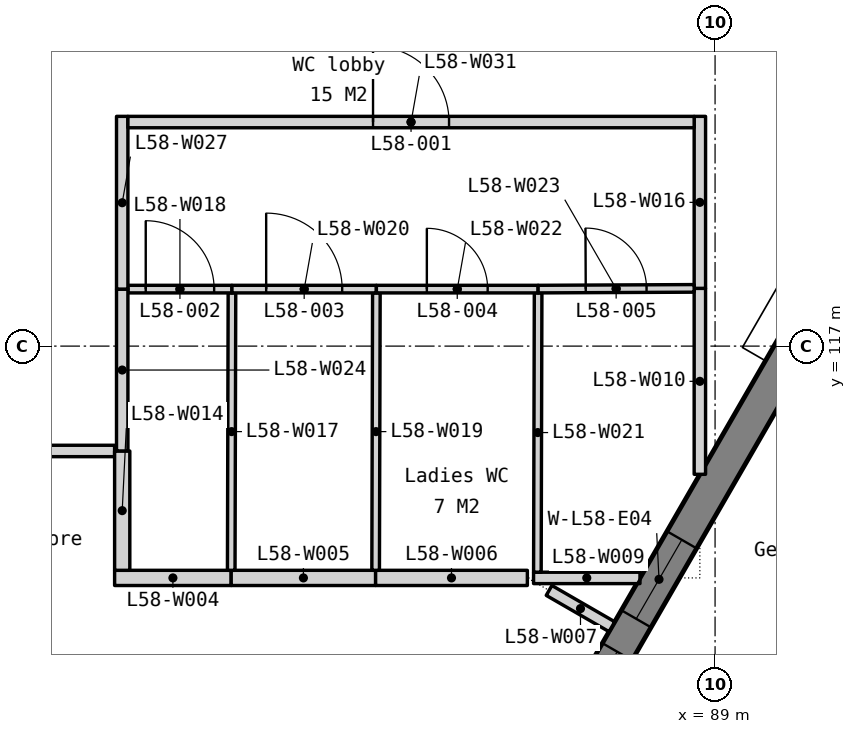
"""IFC4 building model, lengths in metres.
Left out: names, types, materials, properties, quantities, classifications, styles, units other than length and angle.
Written with IfcOpenShell. Run it as: python <this file> out.ifc"""

import sys

from ifc_helpers import new_model, si_unit, direction, frame, frame_2d, origin, place, context, subcontext, project, spatial, polyline, rectangle, outline, extrude, element, fill, save


model = new_model("IFC4")
c1 = context("Model", 3, precision=1e-05, world=origin(), true_north=direction((0.0, 1.0)))
c2 = subcontext(c1, "Body", "Model", "MODEL_VIEW")
j1 = project(units=[si_unit("LENGTHUNIT", "METRE"), si_unit("PLANEANGLEUNIT", "RADIAN")], contexts=[c1])
p1 = place(None, origin())
s1 = spatial("IfcSite", under=j1, at=p1, CompositionType="ELEMENT")
p2 = place(p1, origin())
s2 = spatial("IfcBuilding", under=s1, at=p2, CompositionType="ELEMENT")
p3 = place(p2, frame((0.0, 0.0, 238.7)))
s3 = spatial("IfcBuildingStorey", under=s2, at=p3, CompositionType="ELEMENT", Elevation=238.7)
p4 = place(p3, frame((80.905, 101.188, -0.45), z_axis=(0.0, 0.0, 1.0), x_axis=(0.500002536638, 0.866023939251, 0.0)))
e1 = element("IfcWall", 1, at=p4, inside=s3, PredefinedType="SOLIDWALL", context=c2, shape_type="SweptSolid", body=[
    extrude(outline(polyline([(36.972, 0.0), (36.972, 4.2), (0.0, 4.2), (0.0, 0.0), (36.972, 0.0)])), frame((0.0, 0.225, 0.0), z_axis=(0.0, -1.0, 0.0), x_axis=(1.0, 0.0, 0.0)), (0.0, 0.0, 1.0), 0.45),
])
p5 = place(p4, frame((3.172, 0.0, 1.25)))
e2 = element("IfcOpeningElement", 2, at=p5, cuts=e1, PredefinedType="OPENING", context=c2, shape_type="SweptSolid", body=[
    extrude(rectangle(XDim=1.2, YDim=2.2, at=frame_2d((0.6, 1.1))), frame((0.0, 0.235, 0.0), z_axis=(0.0, -1.0, 0.0), x_axis=(1.0, 0.0, 0.0)), (0.0, 0.0, 1.0), 0.47),
])
p6 = place(p4, frame((4.872, 0.0, 1.25)))
e3 = element("IfcOpeningElement", 3, at=p6, cuts=e1, PredefinedType="OPENING", context=c2, shape_type="SweptSolid", body=[
    extrude(rectangle(XDim=1.2, YDim=2.2, at=frame_2d((0.6, 1.1))), frame((0.0, 0.235, 0.0), z_axis=(0.0, -1.0, 0.0), x_axis=(1.0, 0.0, 0.0)), (0.0, 0.0, 1.0), 0.47),
])
p7 = place(p4, frame((12.415, 0.0, 1.25)))
e4 = element("IfcOpeningElement", 4, at=p7, cuts=e1, PredefinedType="OPENING", context=c2, shape_type="SweptSolid", body=[
    extrude(rectangle(XDim=1.2, YDim=2.2, at=frame_2d((0.6, 1.1))), frame((0.0, 0.235, 0.0), z_axis=(0.0, -1.0, 0.0), x_axis=(1.0, 0.0, 0.0)), (0.0, 0.0, 1.0), 0.47),
])
p8 = place(p4, frame((14.115, 0.0, 1.25)))
e5 = element("IfcOpeningElement", 5, at=p8, cuts=e1, PredefinedType="OPENING", context=c2, shape_type="SweptSolid", body=[
    extrude(rectangle(XDim=1.2, YDim=2.2, at=frame_2d((0.6, 1.1))), frame((0.0, 0.235, 0.0), z_axis=(0.0, -1.0, 0.0), x_axis=(1.0, 0.0, 0.0)), (0.0, 0.0, 1.0), 0.47),
])
p9 = place(p4, frame((21.658, 0.0, 1.25)))
e6 = element("IfcOpeningElement", 6, at=p9, cuts=e1, PredefinedType="OPENING", context=c2, shape_type="SweptSolid", body=[
    extrude(rectangle(XDim=1.2, YDim=2.2, at=frame_2d((0.6, 1.1))), frame((0.0, 0.235, 0.0), z_axis=(0.0, -1.0, 0.0), x_axis=(1.0, 0.0, 0.0)), (0.0, 0.0, 1.0), 0.47),
])
p10 = place(p4, frame((23.358, 0.0, 1.25)))
e7 = element("IfcOpeningElement", 7, at=p10, cuts=e1, PredefinedType="OPENING", context=c2, shape_type="SweptSolid", body=[
    extrude(rectangle(XDim=1.2, YDim=2.2, at=frame_2d((0.6, 1.1))), frame((0.0, 0.235, 0.0), z_axis=(0.0, -1.0, 0.0), x_axis=(1.0, 0.0, 0.0)), (0.0, 0.0, 1.0), 0.47),
])
p11 = place(p4, frame((30.901, 0.0, 1.25)))
e8 = element("IfcOpeningElement", 8, at=p11, cuts=e1, PredefinedType="OPENING", context=c2, shape_type="SweptSolid", body=[
    extrude(rectangle(XDim=1.2, YDim=2.2, at=frame_2d((0.6, 1.1))), frame((0.0, 0.235, 0.0), z_axis=(0.0, -1.0, 0.0), x_axis=(1.0, 0.0, 0.0)), (0.0, 0.0, 1.0), 0.47),
])
p12 = place(p4, frame((32.601, 0.0, 1.25)))
e9 = element("IfcOpeningElement", 9, at=p12, cuts=e1, PredefinedType="OPENING", context=c2, shape_type="SweptSolid", body=[
    extrude(rectangle(XDim=1.2, YDim=2.2, at=frame_2d((0.6, 1.1))), frame((0.0, 0.235, 0.0), z_axis=(0.0, -1.0, 0.0), x_axis=(1.0, 0.0, 0.0)), (0.0, 0.0, 1.0), 0.47),
])
p13 = place(p3, frame((81.1, 113.95, 0.0), z_axis=(0.0, 0.0, 1.0), x_axis=(1.0, 0.0, 0.0)))
e10 = element("IfcWall", 10, at=p13, inside=s3, PredefinedType="PARTITIONING", context=c2, shape_type="SweptSolid", body=[
    extrude(rectangle(XDim=1.534, YDim=0.2, at=frame_2d((0.767, 0.0))), origin(), (0.0, 0.0, 1.0), 3.75),
])
p14 = place(p3, frame((82.634, 113.95, 0.0), z_axis=(0.0, 0.0, 1.0), x_axis=(1.0, 0.0, 0.0)))
e11 = element("IfcWall", 11, at=p14, inside=s3, PredefinedType="PARTITIONING", context=c2, shape_type="SweptSolid", body=[
    extrude(rectangle(XDim=1.9, YDim=0.2, at=frame_2d((0.95, 0.0))), origin(), (0.0, 0.0, 1.0), 3.75),
])
p15 = place(p3, frame((84.534, 113.95, 0.0), z_axis=(0.0, 0.0, 1.0), x_axis=(1.0, 0.0, 0.0)))
e12 = element("IfcWall", 12, at=p15, inside=s3, PredefinedType="PARTITIONING", context=c2, shape_type="SweptSolid", body=[
    extrude(rectangle(XDim=1.997, YDim=0.2, at=frame_2d((0.998, 0.0))), origin(), (0.0, 0.0, 1.0), 3.75),
])
p16 = place(p3, frame((86.816, 113.785, 0.0), z_axis=(0.0, 0.0, 1.0), x_axis=(0.865951249342, -0.500128417272, 0.0)))
e13 = element("IfcWall", 13, at=p16, inside=s3, PredefinedType="PARTITIONING", context=c2, shape_type="SweptSolid", body=[
    extrude(rectangle(XDim=0.954, YDim=0.15, at=frame_2d((0.477, 0.0))), origin(), (0.0, 0.0, 1.0), 3.75),
])
p17 = place(p3, frame((86.612, 113.95, 0.0), z_axis=(0.0, 0.0, 1.0), x_axis=(1.0, 0.0, 0.0)))
e14 = element("IfcWall", 14, at=p17, inside=s3, PredefinedType="PARTITIONING", context=c2, shape_type="SweptSolid", body=[
    extrude(rectangle(XDim=1.4, YDim=0.15, at=frame_2d((0.7, 0.0))), origin(), (0.0, 0.0, 1.0), 3.75),
])
p18 = place(p3, frame((88.8, 115.313, 0.0), z_axis=(0.0, 0.0, 1.0), x_axis=(0.0, 1.0, 0.0)))
e15 = element("IfcWall", 15, at=p18, inside=s3, PredefinedType="PARTITIONING", context=c2, shape_type="SweptSolid", body=[
    extrude(rectangle(XDim=2.447, YDim=0.15, at=frame_2d((1.223, 0.0))), origin(), (0.0, 0.0, 1.0), 3.062),
])
p19 = place(p3, frame((76.363, 115.62, 0.0), z_axis=(0.0, 0.0, 1.0), x_axis=(1.0, 0.0, 0.0)))
e16 = element("IfcWall", 16, at=p19, inside=s3, PredefinedType="PARTITIONING", context=c2, shape_type="SweptSolid", body=[
    extrude(rectangle(XDim=4.737, YDim=0.15, at=frame_2d((2.369, 0.0))), origin(), (0.0, 0.0, 1.0), 3.75),
])
p20 = place(p19, frame((1.469, 0.0, 0.0)))
e17 = element("IfcOpeningElement", 17, at=p20, cuts=e16, PredefinedType="OPENING", context=c2, shape_type="SweptSolid", body=[
    extrude(rectangle(XDim=1.8, YDim=2.1, at=frame_2d((0.9, 1.05))), frame((0.0, 0.085, 0.0), z_axis=(0.0, -1.0, 0.0), x_axis=(1.0, 0.0, 0.0)), (0.0, 0.0, 1.0), 0.17),
])
p21 = place(p3, frame((81.2, 114.05, 0.0), z_axis=(0.0, 0.0, 1.0), x_axis=(0.0, 1.0, 0.0)))
e18 = element("IfcWall", 18, at=p21, inside=s3, PredefinedType="PARTITIONING", context=c2, shape_type="SweptSolid", body=[
    extrude(rectangle(XDim=1.57, YDim=0.2, at=frame_2d((0.785, 0.0))), origin(), (0.0, 0.0, 1.0), 3.75),
])
p22 = place(p3, frame((88.8, 117.76, 0.0), z_axis=(0.0, 0.0, 1.0), x_axis=(0.0, 1.0, 0.0)))
e19 = element("IfcWall", 19, at=p22, inside=s3, PredefinedType="PARTITIONING", context=c2, shape_type="SweptSolid", body=[
    extrude(rectangle(XDim=2.263, YDim=0.15, at=frame_2d((1.131, 0.0))), origin(), (0.0, 0.0, 1.0), 3.062),
])
p23 = place(p3, frame((82.634, 114.05, 0.0), z_axis=(0.0, 0.0, 1.0), x_axis=(0.002608686776, 0.999996597371, 0.0)))
e20 = element("IfcWall", 20, at=p23, inside=s3, PredefinedType="PARTITIONING", context=c2, shape_type="SweptSolid", body=[
    extrude(rectangle(XDim=3.65, YDim=0.1, at=frame_2d((1.825, 0.0))), origin(), (0.0, 0.0, 1.0), 3.75),
])
p24 = place(p3, frame((81.275, 117.75, 0.0), z_axis=(0.0, 0.0, 1.0), x_axis=(1.0, 0.0, 0.0)))
e21 = element("IfcWall", 21, at=p24, inside=s3, PredefinedType="PARTITIONING", context=c2, shape_type="SweptSolid", body=[
    extrude(rectangle(XDim=1.369, YDim=0.1, at=frame_2d((0.685, 0.0))), origin(), (0.0, 0.0, 1.0), 3.75),
])
p25 = place(p24, frame((0.235, 0.0, 0.0)))
e22 = element("IfcOpeningElement", 22, at=p25, cuts=e21, PredefinedType="OPENING", context=c2, shape_type="SweptSolid", body=[
    extrude(rectangle(XDim=0.9, YDim=2.1, at=frame_2d((0.45, 1.05))), frame((0.0, 0.06, 0.0), z_axis=(0.0, -1.0, 0.0), x_axis=(1.0, 0.0, 0.0)), (0.0, 0.0, 1.0), 0.12),
])
p26 = place(p3, frame((84.534, 114.05, 0.0), z_axis=(0.0, 0.0, 1.0), x_axis=(0.002675575707, 0.999996420641, 0.0)))
e23 = element("IfcWall", 23, at=p26, inside=s3, PredefinedType="PARTITIONING", context=c2, shape_type="SweptSolid", body=[
    extrude(rectangle(XDim=3.65, YDim=0.1, at=frame_2d((1.825, 0.0))), origin(), (0.0, 0.0, 1.0), 3.75),
])
p27 = place(p3, frame((82.644, 117.75, 0.0), z_axis=(0.0, 0.0, 1.0), x_axis=(1.0, 0.0, 0.0)))
e24 = element("IfcWall", 24, at=p27, inside=s3, PredefinedType="PARTITIONING", context=c2, shape_type="SweptSolid", body=[
    extrude(rectangle(XDim=1.9, YDim=0.1, at=frame_2d((0.95, 0.0))), origin(), (0.0, 0.0, 1.0), 3.75),
])
p28 = place(p27, frame((0.45, 0.0, 0.0)))
e25 = element("IfcOpeningElement", 25, at=p28, cuts=e24, PredefinedType="OPENING", context=c2, shape_type="SweptSolid", body=[
    extrude(rectangle(XDim=1.0, YDim=2.1, at=frame_2d((0.5, 1.05))), frame((0.0, 0.06, 0.0), z_axis=(0.0, -1.0, 0.0), x_axis=(1.0, 0.0, 0.0)), (0.0, 0.0, 1.0), 0.12),
])
p29 = place(p3, frame((86.662, 114.025, 0.0), z_axis=(0.0, 0.0, 1.0), x_axis=(0.002657268237, 0.999996469457, 0.0)))
e26 = element("IfcWall", 26, at=p29, inside=s3, PredefinedType="PARTITIONING", context=c2, shape_type="SweptSolid", body=[
    extrude(rectangle(XDim=3.675, YDim=0.1, at=frame_2d((1.837, 0.0))), origin(), (0.0, 0.0, 1.0), 3.75),
])
p30 = place(p3, frame((84.544, 117.75, 0.0), z_axis=(0.0, 0.0, 1.0), x_axis=(1.0, 0.0, 0.0)))
e27 = element("IfcWall", 27, at=p30, inside=s3, PredefinedType="PARTITIONING", context=c2, shape_type="SweptSolid", body=[
    extrude(rectangle(XDim=2.128, YDim=0.1, at=frame_2d((1.064, 0.0))), origin(), (0.0, 0.0, 1.0), 3.75),
])
p31 = place(p30, frame((0.664, 0.0, 0.0)))
e28 = element("IfcOpeningElement", 28, at=p31, cuts=e27, PredefinedType="OPENING", context=c2, shape_type="SweptSolid", body=[
    extrude(rectangle(XDim=0.8, YDim=2.1, at=frame_2d((0.4, 1.05))), frame((0.0, 0.06, 0.0), z_axis=(0.0, -1.0, 0.0), x_axis=(1.0, 0.0, 0.0)), (0.0, 0.0, 1.0), 0.12),
])
p32 = place(p3, frame((86.672, 117.75, 0.0), z_axis=(0.0, 0.0, 1.0), x_axis=(0.99998868658, 0.004756754366, 0.0)))
e29 = element("IfcWall", 29, at=p32, inside=s3, PredefinedType="PARTITIONING", context=c2, shape_type="SweptSolid", body=[
    extrude(rectangle(XDim=2.053, YDim=0.1, at=frame_2d((1.026, 0.0))), origin(), (0.0, 0.0, 1.0), 3.75),
])
p33 = place(p32, frame((0.626, 0.0, 0.0)))
e30 = element("IfcOpeningElement", 30, at=p33, cuts=e29, PredefinedType="OPENING", context=c2, shape_type="SweptSolid", body=[
    extrude(rectangle(XDim=0.8, YDim=2.1, at=frame_2d((0.4, 1.05))), frame((0.0, 0.06, 0.0), z_axis=(0.0, -1.0, 0.0), x_axis=(1.0, 0.0, 0.0)), (0.0, 0.0, 1.0), 0.12),
])
p34 = place(p3, frame((81.2, 115.62, 0.0), z_axis=(0.0, 0.0, 1.0), x_axis=(0.0, 1.0, 0.0)))
e31 = element("IfcWall", 31, at=p34, inside=s3, PredefinedType="PARTITIONING", context=c2, shape_type="SweptSolid", body=[
    extrude(rectangle(XDim=2.13, YDim=0.15, at=frame_2d((1.065, 0.0))), origin(), (0.0, 0.0, 1.0), 3.75),
])
p35 = place(p3, frame((81.2, 117.75, 0.0), z_axis=(0.0, 0.0, 1.0), x_axis=(0.0, 1.0, 0.0)))
e32 = element("IfcWall", 32, at=p35, inside=s3, PredefinedType="PARTITIONING", context=c2, shape_type="SweptSolid", body=[
    extrude(rectangle(XDim=2.273, YDim=0.15, at=frame_2d((1.136, 0.0))), origin(), (0.0, 0.0, 1.0), 3.75),
])
p36 = place(p3, frame((81.275, 119.948, 0.0), z_axis=(0.0, 0.0, 1.0), x_axis=(1.0, 0.0, 0.0)))
e33 = element("IfcWall", 33, at=p36, inside=s3, PredefinedType="PARTITIONING", context=c2, shape_type="SweptSolid", body=[
    extrude(rectangle(XDim=7.45, YDim=0.15, at=frame_2d((3.725, 0.0))), origin(), (0.0, 0.0, 1.0), 3.75),
])
p37 = place(p36, frame((3.225, 0.0, 0.0)))
e34 = element("IfcOpeningElement", 34, at=p37, cuts=e33, PredefinedType="OPENING", context=c2, shape_type="SweptSolid", body=[
    extrude(rectangle(XDim=1.0, YDim=2.1, at=frame_2d((0.5, 1.05))), frame((0.0, 0.085, 0.0), z_axis=(0.0, -1.0, 0.0), x_axis=(1.0, 0.0, 0.0)), (0.0, 0.0, 1.0), 0.17),
])
p38 = place(p7, origin())
e35 = element("IfcWindow", 35, at=p38, inside=s3, PartitioningType="SINGLE_PANEL", PredefinedType="WINDOW", context=c2, shape_type="SweptSolid", body=[
    extrude(rectangle(XDim=1.2, YDim=2.2, at=frame_2d((0.6, 1.1))), frame((0.0, 0.03, 0.0), z_axis=(0.0, -1.0, 0.0), x_axis=(1.0, 0.0, 0.0)), (0.0, 0.0, 1.0), 0.06),
])
fill(e4, e35)
p39 = place(p8, origin())
e36 = element("IfcWindow", 36, at=p39, inside=s3, PartitioningType="SINGLE_PANEL", PredefinedType="WINDOW", context=c2, shape_type="SweptSolid", body=[
    extrude(rectangle(XDim=1.2, YDim=2.2, at=frame_2d((0.6, 1.1))), frame((0.0, 0.03, 0.0), z_axis=(0.0, -1.0, 0.0), x_axis=(1.0, 0.0, 0.0)), (0.0, 0.0, 1.0), 0.06),
])
fill(e5, e36)
p40 = place(p37, origin())
e37 = element("IfcDoor", 37, at=p40, inside=s3, OperationType="SINGLE_SWING_LEFT", PredefinedType="DOOR", context=c2, shape_type="SweptSolid", body=[
    extrude(rectangle(XDim=1.0, YDim=2.1, at=frame_2d((0.5, 1.05))), frame((0.0, 0.025, 0.0), z_axis=(0.0, -1.0, 0.0), x_axis=(1.0, 0.0, 0.0)), (0.0, 0.0, 1.0), 0.05),
])
fill(e34, e37)
p41 = place(p25, origin())
e38 = element("IfcDoor", 38, at=p41, inside=s3, OperationType="SINGLE_SWING_LEFT", PredefinedType="DOOR", context=c2, shape_type="SweptSolid", body=[
    extrude(rectangle(XDim=0.9, YDim=2.1, at=frame_2d((0.45, 1.05))), frame((0.0, 0.025, 0.0), z_axis=(0.0, -1.0, 0.0), x_axis=(1.0, 0.0, 0.0)), (0.0, 0.0, 1.0), 0.05),
])
fill(e22, e38)
p42 = place(p28, origin())
e39 = element("IfcDoor", 39, at=p42, inside=s3, OperationType="SINGLE_SWING_LEFT", PredefinedType="DOOR", context=c2, shape_type="SweptSolid", body=[
    extrude(rectangle(XDim=1.0, YDim=2.1, at=frame_2d((0.5, 1.05))), frame((0.0, 0.025, 0.0), z_axis=(0.0, -1.0, 0.0), x_axis=(1.0, 0.0, 0.0)), (0.0, 0.0, 1.0), 0.05),
])
fill(e25, e39)
p43 = place(p31, origin())
e40 = element("IfcDoor", 40, at=p43, inside=s3, OperationType="SINGLE_SWING_LEFT", PredefinedType="DOOR", context=c2, shape_type="SweptSolid", body=[
    extrude(rectangle(XDim=0.8, YDim=2.1, at=frame_2d((0.4, 1.05))), frame((0.0, 0.025, 0.0), z_axis=(0.0, -1.0, 0.0), x_axis=(1.0, 0.0, 0.0)), (0.0, 0.0, 1.0), 0.05),
])
fill(e28, e40)
p44 = place(p33, origin())
e41 = element("IfcDoor", 41, at=p44, inside=s3, OperationType="SINGLE_SWING_LEFT", PredefinedType="DOOR", context=c2, shape_type="SweptSolid", body=[
    extrude(rectangle(XDim=0.8, YDim=2.1, at=frame_2d((0.4, 1.05))), frame((0.0, 0.025, 0.0), z_axis=(0.0, -1.0, 0.0), x_axis=(1.0, 0.0, 0.0)), (0.0, 0.0, 1.0), 0.05),
])
fill(e30, e41)
save(model, sys.argv[1])
